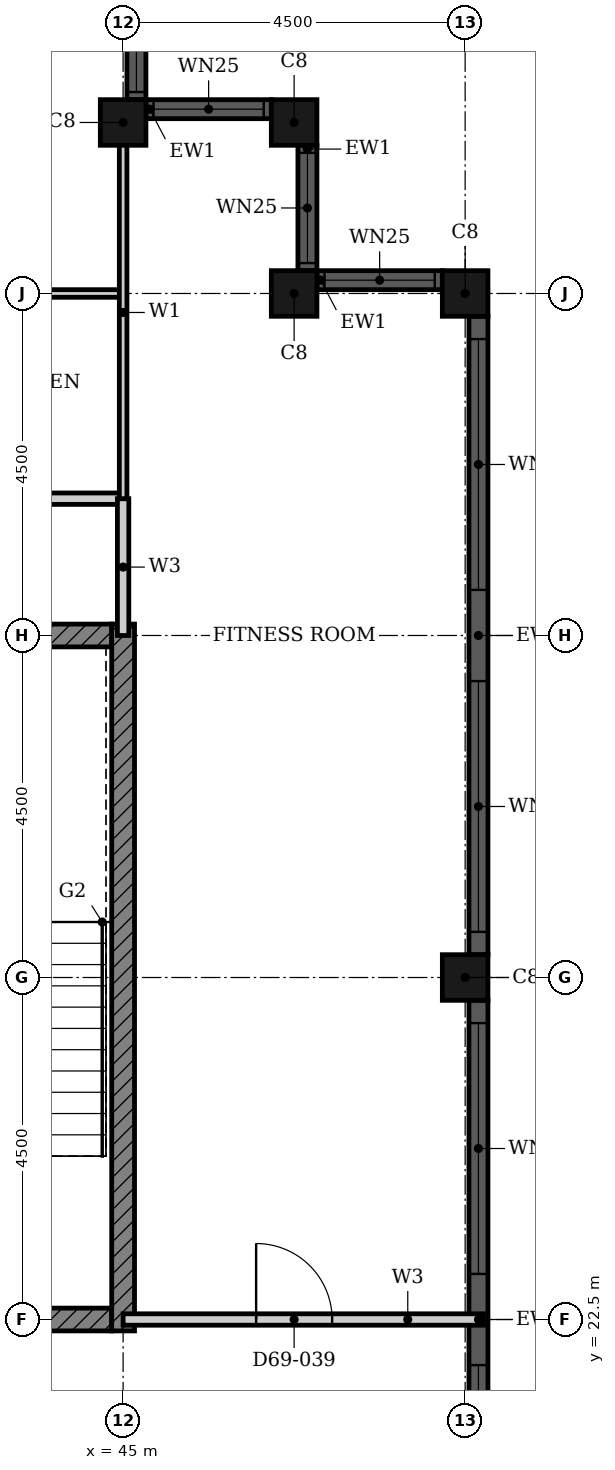
"""IFC4 building model, lengths in metres.
Left out: names, types, materials, properties, quantities, classifications, styles, units other than length and angle.
Written with IfcOpenShell. Run it as: python <this file> out.ifc"""

import sys

from ifc_helpers import new_model, si_unit, direction, frame, frame_2d, origin, origin_2d, place, context, subcontext, project, spatial, rectangle, hollow_rectangle, extrude, element, fill, save


model = new_model("IFC4")
c1 = context("Model", 3, precision=1e-05, world=origin(), true_north=direction((0.0, 1.0)))
c2 = subcontext(c1, "Body", "Model", "MODEL_VIEW")
j1 = project(units=[si_unit("LENGTHUNIT", "METRE"), si_unit("PLANEANGLEUNIT", "RADIAN")], contexts=[c1])
p1 = place(None, origin())
s1 = spatial("IfcSite", under=j1, at=p1, CompositionType="ELEMENT")
p2 = place(p1, origin())
s2 = spatial("IfcBuilding", under=s1, at=p2, CompositionType="ELEMENT")
p3 = place(p2, frame((0.0, 0.0, 271.2)))
s3 = spatial("IfcBuildingStorey", under=s2, at=p3, CompositionType="ELEMENT", Elevation=271.2)
for number, where, z_axis, x_axis in (
    (1, (49.5, 27.0, 0.0), (0.0, 0.0, 1.0), (1.0, 0.0, 0.0)),
    (2, (49.5, 36.0, 0.0), (0.0, 0.0, 1.0), (1.0, 0.0, 0.0)),
    (3, (47.25, 36.0, 0.0), (0.0, 0.0, 1.0), (1.0, 0.0, 0.0)),
    (4, (47.25, 38.25, 0.0), (0.0, 0.0, 1.0), (1.0, 0.0, 0.0)),
    (5, (45.0, 38.25, 0.0), (0.0, 0.0, 1.0), (1.0, 0.0, 0.0)),
):
    element("IfcColumn", number, at=place(p3, frame(where, z_axis=z_axis, x_axis=x_axis)), inside=s3, PredefinedType="COLUMN", context=c2, shape_type="SweptSolid", body=[
        extrude(hollow_rectangle(XDim=0.6, YDim=0.6, WallThickness=0.02, at=origin_2d()), origin(), (0.0, 0.0, 1.0), 3.7),
    ])
p4 = place(p3, frame((49.675, 18.3, 0.0), z_axis=(0.0, 0.0, 1.0), x_axis=(0.0, 1.0, 0.0)))
e6 = element("IfcWall", 6, at=p4, inside=s3, PredefinedType="SOLIDWALL", context=c2, shape_type="SweptSolid", body=[
    extrude(rectangle(XDim=8.4, YDim=0.25, at=frame_2d((4.2, 0.0))), origin(), (0.0, 0.0, 1.0), 3.7),
])
p5 = place(p4, frame((0.3, 0.0, 0.45)))
e7 = element("IfcOpeningElement", 7, at=p5, cuts=e6, PredefinedType="OPENING", context=c2, shape_type="SweptSolid", body=[
    extrude(rectangle(XDim=3.3, YDim=2.3, at=frame_2d((1.65, 1.15))), frame((0.0, 0.135, 0.0), z_axis=(0.0, -1.0, 0.0), x_axis=(1.0, 0.0, 0.0)), (0.0, 0.0, 1.0), 0.27),
])
p6 = place(p4, frame((4.8, 0.0, 0.45)))
e8 = element("IfcOpeningElement", 8, at=p6, cuts=e6, PredefinedType="OPENING", context=c2, shape_type="SweptSolid", body=[
    extrude(rectangle(XDim=3.3, YDim=2.3, at=frame_2d((1.65, 1.15))), frame((0.0, 0.135, 0.0), z_axis=(0.0, -1.0, 0.0), x_axis=(1.0, 0.0, 0.0)), (0.0, 0.0, 1.0), 0.27),
])
p7 = place(p3, frame((49.675, 27.3, 0.0), z_axis=(0.0, 0.0, 1.0), x_axis=(0.0, 1.0, 0.0)))
e9 = element("IfcWall", 9, at=p7, inside=s3, PredefinedType="SOLIDWALL", context=c2, shape_type="SweptSolid", body=[
    extrude(rectangle(XDim=8.4, YDim=0.25, at=frame_2d((4.2, 0.0))), origin(), (0.0, 0.0, 1.0), 3.7),
])
p8 = place(p7, frame((0.3, 0.0, 0.45)))
e10 = element("IfcOpeningElement", 10, at=p8, cuts=e9, PredefinedType="OPENING", context=c2, shape_type="SweptSolid", body=[
    extrude(rectangle(XDim=3.3, YDim=2.3, at=frame_2d((1.65, 1.15))), frame((0.0, 0.135, 0.0), z_axis=(0.0, -1.0, 0.0), x_axis=(1.0, 0.0, 0.0)), (0.0, 0.0, 1.0), 0.27),
])
p9 = place(p7, frame((4.8, 0.0, 0.45)))
e11 = element("IfcOpeningElement", 11, at=p9, cuts=e9, PredefinedType="OPENING", context=c2, shape_type="SweptSolid", body=[
    extrude(rectangle(XDim=3.3, YDim=2.3, at=frame_2d((1.65, 1.15))), frame((0.0, 0.135, 0.0), z_axis=(0.0, -1.0, 0.0), x_axis=(1.0, 0.0, 0.0)), (0.0, 0.0, 1.0), 0.27),
])
p10 = place(p3, frame((49.2, 36.175, 0.0), z_axis=(0.0, 0.0, 1.0), x_axis=(-1.0, 0.0, 0.0)))
e12 = element("IfcWall", 12, at=p10, inside=s3, PredefinedType="SOLIDWALL", context=c2, shape_type="SweptSolid", body=[
    extrude(rectangle(XDim=1.65, YDim=0.25, at=frame_2d((0.825, 0.0))), origin(), (0.0, 0.0, 1.0), 3.7),
])
p11 = place(p10, frame((0.1, 0.0, 0.9)))
e13 = element("IfcOpeningElement", 13, at=p11, cuts=e12, PredefinedType="OPENING", context=c2, shape_type="SweptSolid", body=[
    extrude(rectangle(XDim=1.45, YDim=1.85, at=frame_2d((0.725, 0.925))), frame((0.0, 0.135, 0.0), z_axis=(0.0, -1.0, 0.0), x_axis=(1.0, 0.0, 0.0)), (0.0, 0.0, 1.0), 0.27),
])
p12 = place(p3, frame((47.425, 36.3, 0.0), z_axis=(0.0, 0.0, 1.0), x_axis=(0.0, 1.0, 0.0)))
e14 = element("IfcWall", 14, at=p12, inside=s3, PredefinedType="SOLIDWALL", context=c2, shape_type="SweptSolid", body=[
    extrude(rectangle(XDim=1.65, YDim=0.25, at=frame_2d((0.825, 0.0))), origin(), (0.0, 0.0, 1.0), 3.7),
])
p13 = place(p12, frame((0.1, 0.0, 0.9)))
e15 = element("IfcOpeningElement", 15, at=p13, cuts=e14, PredefinedType="OPENING", context=c2, shape_type="SweptSolid", body=[
    extrude(rectangle(XDim=1.45, YDim=1.85, at=frame_2d((0.725, 0.925))), frame((0.0, 0.135, 0.0), z_axis=(0.0, -1.0, 0.0), x_axis=(1.0, 0.0, 0.0)), (0.0, 0.0, 1.0), 0.27),
])
p14 = place(p3, frame((46.95, 38.425, 0.0), z_axis=(0.0, 0.0, 1.0), x_axis=(-1.0, 0.0, 0.0)))
e16 = element("IfcWall", 16, at=p14, inside=s3, PredefinedType="SOLIDWALL", context=c2, shape_type="SweptSolid", body=[
    extrude(rectangle(XDim=1.65, YDim=0.25, at=frame_2d((0.825, 0.0))), origin(), (0.0, 0.0, 1.0), 3.7),
])
p15 = place(p14, frame((0.1, 0.0, 0.9)))
e17 = element("IfcOpeningElement", 17, at=p15, cuts=e16, PredefinedType="OPENING", context=c2, shape_type="SweptSolid", body=[
    extrude(rectangle(XDim=1.45, YDim=1.85, at=frame_2d((0.725, 0.925))), frame((0.0, 0.135, 0.0), z_axis=(0.0, -1.0, 0.0), x_axis=(1.0, 0.0, 0.0)), (0.0, 0.0, 1.0), 0.27),
])
p16 = place(p3, frame((45.175, 38.55, 0.0), z_axis=(0.0, 0.0, 1.0), x_axis=(0.0, 1.0, 0.0)))
e18 = element("IfcWall", 18, at=p16, inside=s3, PredefinedType="SOLIDWALL", context=c2, shape_type="SweptSolid", body=[
    extrude(rectangle(XDim=1.65, YDim=0.25, at=frame_2d((0.825, 0.0))), origin(), (0.0, 0.0, 1.0), 3.7),
])
p17 = place(p16, frame((0.1, 0.0, 0.9)))
e19 = element("IfcOpeningElement", 19, at=p17, cuts=e18, PredefinedType="OPENING", context=c2, shape_type="SweptSolid", body=[
    extrude(rectangle(XDim=1.45, YDim=1.85, at=frame_2d((0.725, 0.925))), frame((0.0, 0.135, 0.0), z_axis=(0.0, -1.0, 0.0), x_axis=(1.0, 0.0, 0.0)), (0.0, 0.0, 1.0), 0.27),
])
p18 = place(p3, frame((30.339, 22.5, 0.0), z_axis=(0.0, 0.0, 1.0), x_axis=(1.0, 0.0, 0.0)))
e20 = element("IfcWall", 20, at=p18, inside=s3, PredefinedType="SHEAR", context=c2, shape_type="SweptSolid", body=[
    extrude(rectangle(XDim=14.511, YDim=0.3, at=frame_2d((7.255, 0.0))), origin(), (0.0, 0.0, 1.0), 3.4),
])
p19 = place(p18, frame((7.975, 0.0, 0.0)))
e21 = element("IfcOpeningElement", 21, at=p19, cuts=e20, PredefinedType="OPENING", context=c2, shape_type="SweptSolid", body=[
    extrude(rectangle(XDim=1.8, YDim=2.1, at=frame_2d((0.9, 1.05))), frame((0.0, 0.16, 0.0), z_axis=(0.0, -1.0, 0.0), x_axis=(1.0, 0.0, 0.0)), (0.0, 0.0, 1.0), 0.32),
])
p20 = place(p3, frame((40.625, 31.5, 0.0), z_axis=(0.0, 0.0, 1.0), x_axis=(1.0, 0.0, 0.0)))
e22 = element("IfcWall", 22, at=p20, inside=s3, PredefinedType="SHEAR", context=c2, shape_type="SweptSolid", body=[
    extrude(rectangle(XDim=4.225, YDim=0.3, at=frame_2d((2.113, 0.0))), origin(), (0.0, 0.0, 1.0), 3.4),
])
p21 = place(p3, frame((45.0, 22.35, 0.0), z_axis=(0.0, 0.0, 1.0), x_axis=(0.0, 1.0, 0.0)))
e23 = element("IfcWall", 23, at=p21, inside=s3, PredefinedType="SHEAR", context=c2, shape_type="SweptSolid", body=[
    extrude(rectangle(XDim=9.3, YDim=0.3, at=frame_2d((4.65, 0.0))), origin(), (0.0, 0.0, 1.0), 3.4),
])
p22 = place(p3, frame((45.0, 22.5, 0.0), z_axis=(0.0, 0.0, 1.0), x_axis=(1.0, 0.0, 0.0)))
e24 = element("IfcWall", 24, at=p22, inside=s3, PredefinedType="PARTITIONING", context=c2, shape_type="SweptSolid", body=[
    extrude(rectangle(XDim=4.74, YDim=0.15, at=frame_2d((2.37, 0.0))), origin(), (0.0, 0.0, 1.0), 3.4),
])
p23 = place(p22, frame((1.75, 0.0, 0.0)))
e25 = element("IfcOpeningElement", 25, at=p23, cuts=e24, PredefinedType="OPENING", context=c2, shape_type="SweptSolid", body=[
    extrude(rectangle(XDim=1.0, YDim=2.1, at=frame_2d((0.5, 1.05))), frame((0.0, 0.085, 0.0), z_axis=(0.0, -1.0, 0.0), x_axis=(1.0, 0.0, 0.0)), (0.0, 0.0, 1.0), 0.17),
])
p24 = place(p3, frame((38.4, 33.3, 0.0), z_axis=(0.0, 0.0, 1.0), x_axis=(1.0, 0.0, 0.0)))
e26 = element("IfcWall", 26, at=p24, inside=s3, PredefinedType="PARTITIONING", context=c2, shape_type="SweptSolid", body=[
    extrude(rectangle(XDim=6.6, YDim=0.15, at=frame_2d((3.3, 0.0))), origin(), (0.0, 0.0, 1.0), 3.4),
])
p25 = place(p24, frame((1.3, 0.0, 0.0)))
e27 = element("IfcOpeningElement", 27, at=p25, cuts=e26, PredefinedType="OPENING", context=c2, shape_type="SweptSolid", body=[
    extrude(rectangle(XDim=1.0, YDim=2.2, at=frame_2d((0.5, 1.1))), frame((0.0, 0.085, 0.0), z_axis=(0.0, -1.0, 0.0), x_axis=(1.0, 0.0, 0.0)), (0.0, 0.0, 1.0), 0.17),
])
p26 = place(p3, frame((45.0, 31.5, 0.0), z_axis=(0.0, 0.0, 1.0), x_axis=(0.0, 1.0, 0.0)))
e28 = element("IfcWall", 28, at=p26, inside=s3, PredefinedType="PARTITIONING", context=c2, shape_type="SweptSolid", body=[
    extrude(rectangle(XDim=1.8, YDim=0.15, at=frame_2d((0.9, 0.0))), origin(), (0.0, 0.0, 1.0), 3.4),
])
p27 = place(p3, frame((42.0, 36.0, 0.0), z_axis=(0.0, 0.0, 1.0), x_axis=(1.0, 0.0, 0.0)))
e29 = element("IfcWall", 29, at=p27, inside=s3, PredefinedType="PARTITIONING", context=c2, shape_type="SweptSolid", body=[
    extrude(rectangle(XDim=3.0, YDim=0.1, at=frame_2d((1.5, 0.0))), origin(), (0.0, 0.0, 1.0), 3.4),
])
p28 = place(p27, frame((1.05, 0.0, 0.0)))
e30 = element("IfcOpeningElement", 30, at=p28, cuts=e29, PredefinedType="OPENING", context=c2, shape_type="SweptSolid", body=[
    extrude(rectangle(XDim=0.9, YDim=2.1, at=frame_2d((0.45, 1.05))), frame((0.0, 0.06, 0.0), z_axis=(0.0, -1.0, 0.0), x_axis=(1.0, 0.0, 0.0)), (0.0, 0.0, 1.0), 0.12),
])
p29 = place(p3, frame((45.0, 33.3, 0.0), z_axis=(0.0, 0.0, 1.0), x_axis=(0.0, 1.0, 0.0)))
e31 = element("IfcWall", 31, at=p29, inside=s3, PredefinedType="PARTITIONING", context=c2, shape_type="SweptSolid", body=[
    extrude(rectangle(XDim=4.9, YDim=0.1, at=frame_2d((2.45, 0.0))), origin(), (0.0, 0.0, 1.0), 3.4),
])
p30 = place(p5, origin())
e32 = element("IfcWindow", 32, at=p30, inside=s3, PartitioningType="SINGLE_PANEL", PredefinedType="WINDOW", context=c2, shape_type="SweptSolid", body=[
    extrude(rectangle(XDim=3.3, YDim=2.3, at=frame_2d((1.65, 1.15))), frame((0.0, 0.03, 0.0), z_axis=(0.0, -1.0, 0.0), x_axis=(1.0, 0.0, 0.0)), (0.0, 0.0, 1.0), 0.06),
])
fill(e7, e32)
p31 = place(p6, origin())
e33 = element("IfcWindow", 33, at=p31, inside=s3, PartitioningType="SINGLE_PANEL", PredefinedType="WINDOW", context=c2, shape_type="SweptSolid", body=[
    extrude(rectangle(XDim=3.3, YDim=2.3, at=frame_2d((1.65, 1.15))), frame((0.0, 0.03, 0.0), z_axis=(0.0, -1.0, 0.0), x_axis=(1.0, 0.0, 0.0)), (0.0, 0.0, 1.0), 0.06),
])
fill(e8, e33)
p32 = place(p8, origin())
e34 = element("IfcWindow", 34, at=p32, inside=s3, PartitioningType="SINGLE_PANEL", PredefinedType="WINDOW", context=c2, shape_type="SweptSolid", body=[
    extrude(rectangle(XDim=3.3, YDim=2.3, at=frame_2d((1.65, 1.15))), frame((0.0, 0.03, 0.0), z_axis=(0.0, -1.0, 0.0), x_axis=(1.0, 0.0, 0.0)), (0.0, 0.0, 1.0), 0.06),
])
fill(e10, e34)
p33 = place(p9, origin())
e35 = element("IfcWindow", 35, at=p33, inside=s3, PartitioningType="SINGLE_PANEL", PredefinedType="WINDOW", context=c2, shape_type="SweptSolid", body=[
    extrude(rectangle(XDim=3.3, YDim=2.3, at=frame_2d((1.65, 1.15))), frame((0.0, 0.03, 0.0), z_axis=(0.0, -1.0, 0.0), x_axis=(1.0, 0.0, 0.0)), (0.0, 0.0, 1.0), 0.06),
])
fill(e11, e35)
p34 = place(p11, origin())
e36 = element("IfcWindow", 36, at=p34, inside=s3, PartitioningType="SINGLE_PANEL", PredefinedType="WINDOW", context=c2, shape_type="SweptSolid", body=[
    extrude(rectangle(XDim=1.45, YDim=1.85, at=frame_2d((0.725, 0.925))), frame((0.0, 0.03, 0.0), z_axis=(0.0, -1.0, 0.0), x_axis=(1.0, 0.0, 0.0)), (0.0, 0.0, 1.0), 0.06),
])
fill(e13, e36)
p35 = place(p13, origin())
e37 = element("IfcWindow", 37, at=p35, inside=s3, PartitioningType="SINGLE_PANEL", PredefinedType="WINDOW", context=c2, shape_type="SweptSolid", body=[
    extrude(rectangle(XDim=1.45, YDim=1.85, at=frame_2d((0.725, 0.925))), frame((0.0, 0.03, 0.0), z_axis=(0.0, -1.0, 0.0), x_axis=(1.0, 0.0, 0.0)), (0.0, 0.0, 1.0), 0.06),
])
fill(e15, e37)
p36 = place(p15, origin())
e38 = element("IfcWindow", 38, at=p36, inside=s3, PartitioningType="SINGLE_PANEL", PredefinedType="WINDOW", context=c2, shape_type="SweptSolid", body=[
    extrude(rectangle(XDim=1.45, YDim=1.85, at=frame_2d((0.725, 0.925))), frame((0.0, 0.03, 0.0), z_axis=(0.0, -1.0, 0.0), x_axis=(1.0, 0.0, 0.0)), (0.0, 0.0, 1.0), 0.06),
])
fill(e17, e38)
p37 = place(p17, origin())
e39 = element("IfcWindow", 39, at=p37, inside=s3, PartitioningType="SINGLE_PANEL", PredefinedType="WINDOW", context=c2, shape_type="SweptSolid", body=[
    extrude(rectangle(XDim=1.45, YDim=1.85, at=frame_2d((0.725, 0.925))), frame((0.0, 0.03, 0.0), z_axis=(0.0, -1.0, 0.0), x_axis=(1.0, 0.0, 0.0)), (0.0, 0.0, 1.0), 0.06),
])
fill(e19, e39)
p38 = place(p23, origin())
e40 = element("IfcDoor", 40, at=p38, inside=s3, OperationType="SINGLE_SWING_LEFT", PredefinedType="DOOR", context=c2, shape_type="SweptSolid", body=[
    extrude(rectangle(XDim=1.0, YDim=2.1, at=frame_2d((0.5, 1.05))), frame((0.0, 0.025, 0.0), z_axis=(0.0, -1.0, 0.0), x_axis=(1.0, 0.0, 0.0)), (0.0, 0.0, 1.0), 0.05),
])
fill(e25, e40)
save(model, sys.argv[1])
